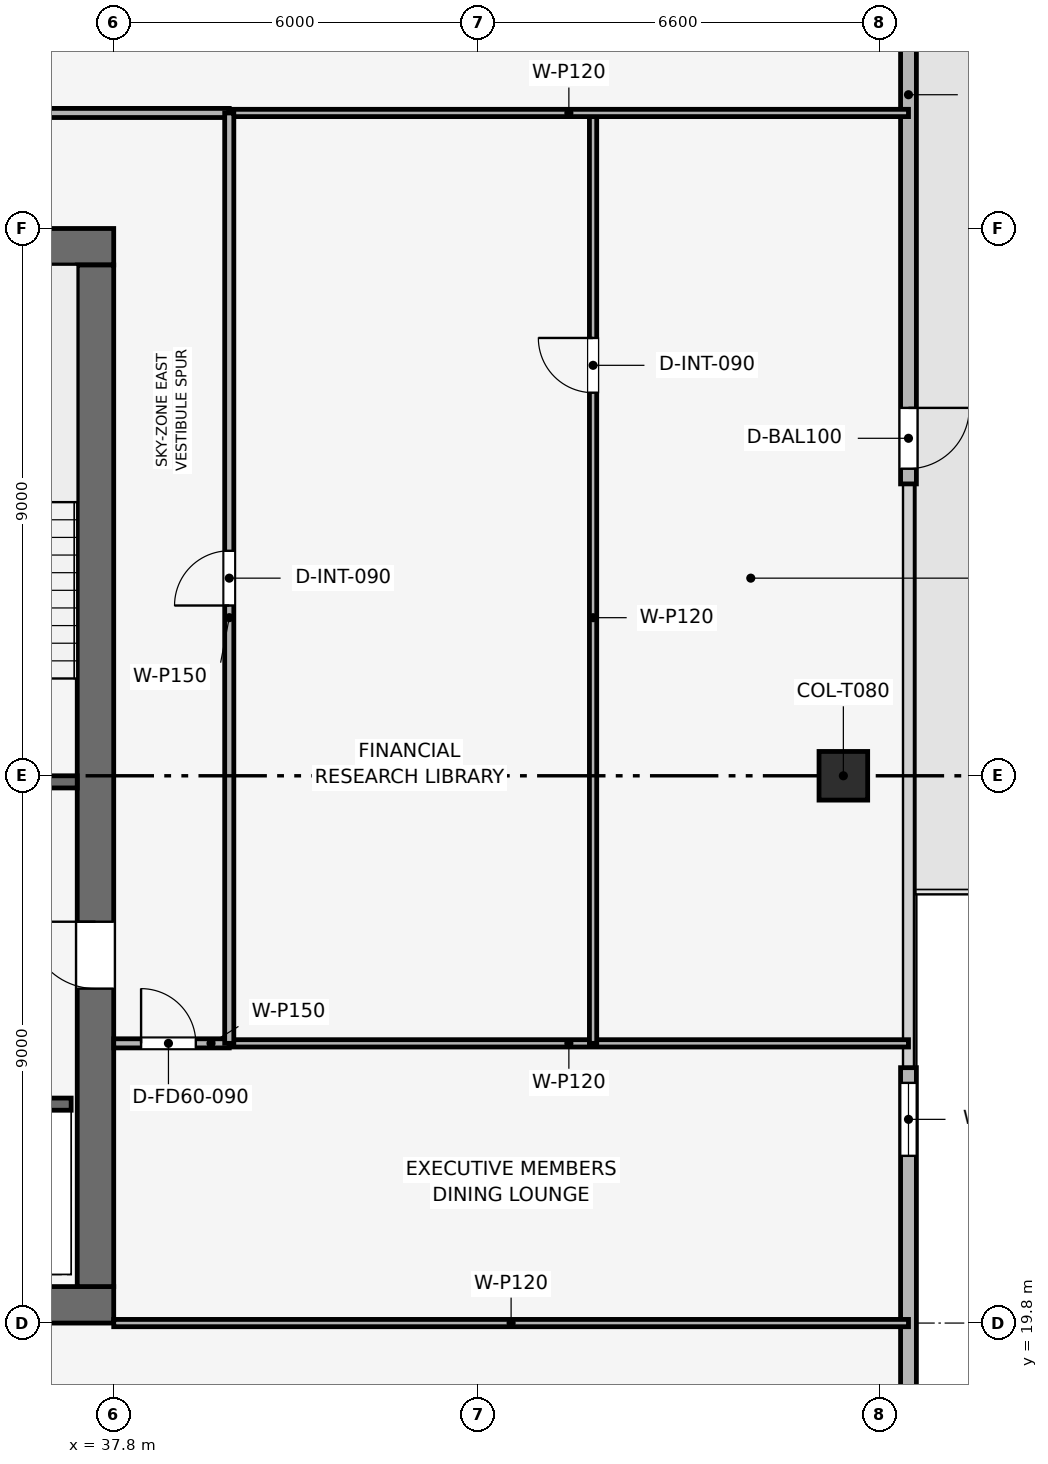
"""IFC4 building model, lengths in metres.
Left out: names, types, materials, properties, quantities, classifications, styles, units other than length and angle.
Written with IfcOpenShell. Run it as: python <this file> out.ifc"""

import sys

from ifc_helpers import new_model, si_unit, direction, frame, frame_2d, origin, origin_2d, place, context, subcontext, project, spatial, rectangle, extrude, element, fill, save


model = new_model("IFC4")
c1 = context("Model", 3, precision=1e-05, world=origin(), true_north=direction((0.0, 1.0)))
c2 = subcontext(c1, "Body", "Model", "MODEL_VIEW")
j1 = project(units=[si_unit("LENGTHUNIT", "METRE"), si_unit("PLANEANGLEUNIT", "RADIAN")], contexts=[c1])
p1 = place(None, origin())
s1 = spatial("IfcSite", under=j1, at=p1, CompositionType="ELEMENT")
p2 = place(p1, origin())
s2 = spatial("IfcBuilding", under=s1, at=p2, CompositionType="ELEMENT")
p3 = place(p2, frame((0.0, 0.0, 340.5)))
s3 = spatial("IfcBuildingStorey", under=s2, at=p3, CompositionType="ELEMENT", Elevation=340.5)
p4 = place(p3, frame((19.8, 20.1, 0.0), z_axis=(0.0, 0.0, 1.0), x_axis=(1.0, 0.0, 0.0)))
e1 = element("IfcWall", 1, at=p4, inside=s3, PredefinedType="SHEAR", context=c2, shape_type="SweptSolid", body=[
    extrude(rectangle(XDim=18.0, YDim=0.6, at=frame_2d((9.0, 0.0))), origin(), (0.0, 0.0, 1.0), 3.75),
])
p5 = place(p3, frame((19.8, 37.5, 0.0), z_axis=(0.0, 0.0, 1.0), x_axis=(1.0, 0.0, 0.0)))
e2 = element("IfcWall", 2, at=p5, inside=s3, PredefinedType="SHEAR", context=c2, shape_type="SweptSolid", body=[
    extrude(rectangle(XDim=18.0, YDim=0.6, at=frame_2d((9.0, 0.0))), origin(), (0.0, 0.0, 1.0), 3.75),
])
p6 = place(p5, frame((7.05, 0.0, 0.0)))
e3 = element("IfcOpeningElement", 3, at=p6, cuts=e2, PredefinedType="OPENING", context=c2, shape_type="SweptSolid", body=[
    extrude(rectangle(XDim=1.1, YDim=2.15, at=frame_2d((0.55, 1.075))), frame((0.0, 0.31, 0.0), z_axis=(0.0, -1.0, 0.0), x_axis=(1.0, 0.0, 0.0)), (0.0, 0.0, 1.0), 0.62),
])
p7 = place(p3, frame((37.5, 20.4, 0.0), z_axis=(0.0, 0.0, 1.0), x_axis=(0.0, 1.0, 0.0)))
e4 = element("IfcWall", 4, at=p7, inside=s3, PredefinedType="SHEAR", context=c2, shape_type="SweptSolid", body=[
    extrude(rectangle(XDim=16.8, YDim=0.6, at=frame_2d((8.4, 0.0))), origin(), (0.0, 0.0, 1.0), 3.75),
])
p8 = place(p7, frame((4.9, 0.0, 0.0)))
e5 = element("IfcOpeningElement", 5, at=p8, cuts=e4, PredefinedType="OPENING", context=c2, shape_type="SweptSolid", body=[
    extrude(rectangle(XDim=1.1, YDim=2.15, at=frame_2d((0.55, 1.075))), frame((0.0, 0.31, 0.0), z_axis=(0.0, -1.0, 0.0), x_axis=(1.0, 0.0, 0.0)), (0.0, 0.0, 1.0), 0.62),
])
p9 = place(p3, frame((49.799, 28.8, 0.003), z_axis=(-0.23339088867, 0.0, 0.972382997119), x_axis=(0.0, -1.0, 0.0)))
e6 = element("IfcColumn", 6, at=p9, inside=s3, PredefinedType="COLUMN", context=c2, shape_type="SweptSolid", body=[
    extrude(rectangle(XDim=0.8, YDim=0.8, at=origin_2d()), origin(), (0.0, 0.0, 1.0), 3.604),
])
p10 = place(p3, frame((50.87, 45.0, 0.0), z_axis=(0.0, 0.0, 1.0), x_axis=(0.0, -1.0, 0.0)))
e7 = element("IfcWall", 7, at=p10, inside=s3, PredefinedType="SOLIDWALL", context=c2, shape_type="SweptSolid", body=[
    extrude(rectangle(XDim=11.4, YDim=0.26, at=frame_2d((5.7, 0.0))), origin(), (0.0, 0.0, 1.0), 3.51),
])
p11 = place(p10, frame((10.15, 0.0, 0.0)))
e8 = element("IfcOpeningElement", 8, at=p11, cuts=e7, PredefinedType="OPENING", context=c2, shape_type="SweptSolid", body=[
    extrude(rectangle(XDim=1.0, YDim=2.2, at=frame_2d((0.5, 1.1))), frame((0.0, 0.14, 0.0), z_axis=(0.0, -1.0, 0.0), x_axis=(1.0, 0.0, 0.0)), (0.0, 0.0, 1.0), 0.28),
])
p12 = place(p3, frame((50.87, 24.0, 0.0), z_axis=(0.0, 0.0, 1.0), x_axis=(0.0, -1.0, 0.0)))
e9 = element("IfcWall", 9, at=p12, inside=s3, PredefinedType="SOLIDWALL", context=c2, shape_type="SweptSolid", body=[
    extrude(rectangle(XDim=11.4, YDim=0.26, at=frame_2d((5.7, 0.0))), origin(), (0.0, 0.0, 1.0), 3.51),
])
p13 = place(p12, frame((0.25, 0.0, 0.9)))
e10 = element("IfcOpeningElement", 10, at=p13, cuts=e9, PredefinedType="OPENING", context=c2, shape_type="SweptSolid", body=[
    extrude(rectangle(XDim=1.2, YDim=2.1, at=frame_2d((0.6, 1.05))), frame((0.0, 0.14, 0.0), z_axis=(0.0, -1.0, 0.0), x_axis=(1.0, 0.0, 0.0)), (0.0, 0.0, 1.0), 0.28),
])
p14 = place(p3, frame((34.05, 28.7, 0.0), z_axis=(0.0, 0.0, 1.0), x_axis=(1.0, 0.0, 0.0)))
e11 = element("IfcWall", 11, at=p14, inside=s3, PredefinedType="SHEAR", context=c2, shape_type="SweptSolid", body=[
    extrude(rectangle(XDim=3.15, YDim=0.2, at=frame_2d((1.575, 0.0))), origin(), (0.0, 0.0, 1.0), 3.51),
])
p15 = place(p14, frame((0.8, 0.0, 0.0)))
e12 = element("IfcOpeningElement", 12, at=p15, cuts=e11, PredefinedType="OPENING", context=c2, shape_type="SweptSolid", body=[
    extrude(rectangle(XDim=1.0, YDim=2.1, at=frame_2d((0.5, 1.05))), frame((0.0, 0.11, 0.0), z_axis=(0.0, -1.0, 0.0), x_axis=(1.0, 0.0, 0.0)), (0.0, 0.0, 1.0), 0.22),
])
p16 = place(p3, frame((34.05, 23.4, 0.0), z_axis=(0.0, 0.0, 1.0), x_axis=(1.0, 0.0, 0.0)))
e13 = element("IfcWall", 13, at=p16, inside=s3, PredefinedType="SHEAR", context=c2, shape_type="SweptSolid", body=[
    extrude(rectangle(XDim=3.05, YDim=0.2, at=frame_2d((1.525, 0.0))), origin(), (0.0, 0.0, 1.0), 3.51),
])
p17 = place(p16, frame((1.2, 0.0, 0.0)))
e14 = element("IfcOpeningElement", 14, at=p17, cuts=e13, PredefinedType="OPENING", context=c2, shape_type="SweptSolid", body=[
    extrude(rectangle(XDim=1.1, YDim=2.15, at=frame_2d((0.55, 1.075))), frame((0.0, 0.11, 0.0), z_axis=(0.0, -1.0, 0.0), x_axis=(1.0, 0.0, 0.0)), (0.0, 0.0, 1.0), 0.22),
])
p18 = place(p3, frame((37.8, 19.8, 0.0), z_axis=(0.0, 0.0, 1.0), x_axis=(1.0, 0.0, 0.0)))
e15 = element("IfcWall", 15, at=p18, inside=s3, PredefinedType="PARTITIONING", context=c2, shape_type="SweptSolid", body=[
    extrude(rectangle(XDim=13.07, YDim=0.12, at=frame_2d((6.535, 0.0))), origin(), (0.0, 0.0, 1.0), 3.095),
])
p19 = place(p3, frame((37.8, 24.4, 0.0), z_axis=(0.0, 0.0, 1.0), x_axis=(1.0, 0.0, 0.0)))
e16 = element("IfcWall", 16, at=p19, inside=s3, PredefinedType="PARTITIONING", context=c2, shape_type="SweptSolid", body=[
    extrude(rectangle(XDim=1.9, YDim=0.15, at=frame_2d((0.95, 0.0))), origin(), (0.0, 0.0, 1.0), 3.51),
])
p20 = place(p19, frame((0.45, 0.0, 0.0)))
e17 = element("IfcOpeningElement", 17, at=p20, cuts=e16, PredefinedType="OPENING", context=c2, shape_type="SweptSolid", body=[
    extrude(rectangle(XDim=0.9, YDim=2.1, at=frame_2d((0.45, 1.05))), frame((0.0, 0.085, 0.0), z_axis=(0.0, -1.0, 0.0), x_axis=(1.0, 0.0, 0.0)), (0.0, 0.0, 1.0), 0.17),
])
p21 = place(p3, frame((39.7, 24.4, 0.0), z_axis=(0.0, 0.0, 1.0), x_axis=(1.0, 0.0, 0.0)))
e18 = element("IfcWall", 18, at=p21, inside=s3, PredefinedType="PARTITIONING", context=c2, shape_type="SweptSolid", body=[
    extrude(rectangle(XDim=11.17, YDim=0.12, at=frame_2d((5.585, 0.0))), origin(), (0.0, 0.0, 1.0), 3.135),
])
p22 = place(p3, frame((45.683, 24.4, 0.0), z_axis=(0.0, 0.0, 1.0), x_axis=(0.0, 1.0, 0.0)))
e19 = element("IfcWall", 19, at=p22, inside=s3, PredefinedType="PARTITIONING", context=c2, shape_type="SweptSolid", body=[
    extrude(rectangle(XDim=15.3, YDim=0.12, at=frame_2d((7.65, 0.0))), origin(), (0.0, 0.0, 1.0), 3.095),
])
p23 = place(p22, frame((10.7, 0.0, 0.0)))
e20 = element("IfcOpeningElement", 20, at=p23, cuts=e19, PredefinedType="OPENING", context=c2, shape_type="SweptSolid", body=[
    extrude(rectangle(XDim=0.9, YDim=2.1, at=frame_2d((0.45, 1.05))), frame((0.0, 0.07, 0.0), z_axis=(0.0, -1.0, 0.0), x_axis=(1.0, 0.0, 0.0)), (0.0, 0.0, 1.0), 0.14),
])
p24 = place(p3, frame((39.7, 39.7, 0.0), z_axis=(0.0, 0.0, 1.0), x_axis=(1.0, 0.0, 0.0)))
e21 = element("IfcWall", 21, at=p24, inside=s3, PredefinedType="PARTITIONING", context=c2, shape_type="SweptSolid", body=[
    extrude(rectangle(XDim=11.17, YDim=0.12, at=frame_2d((5.585, 0.0))), origin(), (0.0, 0.0, 1.0), 3.095),
])
p25 = place(p3, frame((17.9, 39.7, 0.0), z_axis=(0.0, 0.0, 1.0), x_axis=(1.0, 0.0, 0.0)))
e22 = element("IfcWall", 22, at=p25, inside=s3, PredefinedType="PARTITIONING", context=c2, shape_type="SweptSolid", body=[
    extrude(rectangle(XDim=21.8, YDim=0.15, at=frame_2d((10.9, 0.0))), origin(), (0.0, 0.0, 1.0), 3.095),
])
p26 = place(p25, frame((2.1, 0.0, 0.0)))
e23 = element("IfcOpeningElement", 23, at=p26, cuts=e22, PredefinedType="OPENING", context=c2, shape_type="SweptSolid", body=[
    extrude(rectangle(XDim=0.9, YDim=2.1, at=frame_2d((0.45, 1.05))), frame((0.0, 0.085, 0.0), z_axis=(0.0, -1.0, 0.0), x_axis=(1.0, 0.0, 0.0)), (0.0, 0.0, 1.0), 0.17),
])
p27 = place(p25, frame((6.05, 0.0, 0.0)))
e24 = element("IfcOpeningElement", 24, at=p27, cuts=e22, PredefinedType="OPENING", context=c2, shape_type="SweptSolid", body=[
    extrude(rectangle(XDim=0.9, YDim=2.1, at=frame_2d((0.45, 1.05))), frame((0.0, 0.085, 0.0), z_axis=(0.0, -1.0, 0.0), x_axis=(1.0, 0.0, 0.0)), (0.0, 0.0, 1.0), 0.17),
])
p28 = place(p25, frame((8.95, 0.0, 0.0)))
e25 = element("IfcOpeningElement", 25, at=p28, cuts=e22, PredefinedType="OPENING", context=c2, shape_type="SweptSolid", body=[
    extrude(rectangle(XDim=0.9, YDim=2.1, at=frame_2d((0.45, 1.05))), frame((0.0, 0.085, 0.0), z_axis=(0.0, -1.0, 0.0), x_axis=(1.0, 0.0, 0.0)), (0.0, 0.0, 1.0), 0.17),
])
p29 = place(p25, frame((11.7, 0.0, 0.0)))
e26 = element("IfcOpeningElement", 26, at=p29, cuts=e22, PredefinedType="OPENING", context=c2, shape_type="SweptSolid", body=[
    extrude(rectangle(XDim=0.95, YDim=2.1, at=frame_2d((0.475, 1.05))), frame((0.0, 0.085, 0.0), z_axis=(0.0, -1.0, 0.0), x_axis=(1.0, 0.0, 0.0)), (0.0, 0.0, 1.0), 0.17),
])
p30 = place(p25, frame((17.2, 0.0, 0.0)))
e27 = element("IfcOpeningElement", 27, at=p30, cuts=e22, PredefinedType="OPENING", context=c2, shape_type="SweptSolid", body=[
    extrude(rectangle(XDim=0.9, YDim=2.1, at=frame_2d((0.45, 1.05))), frame((0.0, 0.085, 0.0), z_axis=(0.0, -1.0, 0.0), x_axis=(1.0, 0.0, 0.0)), (0.0, 0.0, 1.0), 0.17),
])
p31 = place(p3, frame((39.7, 24.4, 0.0), z_axis=(0.0, 0.0, 1.0), x_axis=(0.0, 1.0, 0.0)))
e28 = element("IfcWall", 28, at=p31, inside=s3, PredefinedType="PARTITIONING", context=c2, shape_type="SweptSolid", body=[
    extrude(rectangle(XDim=15.3, YDim=0.15, at=frame_2d((7.65, 0.0))), origin(), (0.0, 0.0, 1.0), 3.095),
])
p32 = place(p31, frame((7.2, 0.0, 0.0)))
e29 = element("IfcOpeningElement", 29, at=p32, cuts=e28, PredefinedType="OPENING", context=c2, shape_type="SweptSolid", body=[
    extrude(rectangle(XDim=0.9, YDim=2.1, at=frame_2d((0.45, 1.05))), frame((0.0, 0.085, 0.0), z_axis=(0.0, -1.0, 0.0), x_axis=(1.0, 0.0, 0.0)), (0.0, 0.0, 1.0), 0.17),
])
p33 = place(p11, origin())
e30 = element("IfcDoor", 30, at=p33, inside=s3, OperationType="SINGLE_SWING_LEFT", PredefinedType="DOOR", context=c2, shape_type="SweptSolid", body=[
    extrude(rectangle(XDim=1.0, YDim=2.2, at=frame_2d((0.5, 1.1))), frame((0.0, 0.025, 0.0), z_axis=(0.0, -1.0, 0.0), x_axis=(1.0, 0.0, 0.0)), (0.0, 0.0, 1.0), 0.05),
])
fill(e8, e30)
p34 = place(p13, origin())
e31 = element("IfcWindow", 31, at=p34, inside=s3, PartitioningType="SINGLE_PANEL", PredefinedType="WINDOW", context=c2, shape_type="SweptSolid", body=[
    extrude(rectangle(XDim=1.2, YDim=2.1, at=frame_2d((0.6, 1.05))), frame((0.0, 0.03, 0.0), z_axis=(0.0, -1.0, 0.0), x_axis=(1.0, 0.0, 0.0)), (0.0, 0.0, 1.0), 0.06),
])
fill(e10, e31)
p35 = place(p20, origin())
e32 = element("IfcDoor", 32, at=p35, inside=s3, OperationType="SINGLE_SWING_LEFT", PredefinedType="DOOR", context=c2, shape_type="SweptSolid", body=[
    extrude(rectangle(XDim=0.9, YDim=2.1, at=frame_2d((0.45, 1.05))), frame((0.0, 0.025, 0.0), z_axis=(0.0, -1.0, 0.0), x_axis=(1.0, 0.0, 0.0)), (0.0, 0.0, 1.0), 0.05),
])
fill(e17, e32)
p36 = place(p23, origin())
e33 = element("IfcDoor", 33, at=p36, inside=s3, OperationType="SINGLE_SWING_RIGHT", PredefinedType="DOOR", context=c2, shape_type="SweptSolid", body=[
    extrude(rectangle(XDim=0.9, YDim=2.1, at=frame_2d((0.45, 1.05))), frame((0.0, 0.025, 0.0), z_axis=(0.0, -1.0, 0.0), x_axis=(1.0, 0.0, 0.0)), (0.0, 0.0, 1.0), 0.05),
])
fill(e20, e33)
p37 = place(p32, origin())
e34 = element("IfcDoor", 34, at=p37, inside=s3, OperationType="SINGLE_SWING_LEFT", PredefinedType="DOOR", context=c2, shape_type="SweptSolid", body=[
    extrude(rectangle(XDim=0.9, YDim=2.1, at=frame_2d((0.45, 1.05))), frame((0.0, 0.025, 0.0), z_axis=(0.0, -1.0, 0.0), x_axis=(1.0, 0.0, 0.0)), (0.0, 0.0, 1.0), 0.05),
])
fill(e29, e34)
p38 = place(p8, origin())
e35 = element("IfcDoor", 35, at=p38, inside=s3, OperationType="SINGLE_SWING_RIGHT", PredefinedType="DOOR", context=c2, shape_type="SweptSolid", body=[
    extrude(rectangle(XDim=1.1, YDim=2.15, at=frame_2d((0.55, 1.075))), frame((0.0, 0.025, 0.0), z_axis=(0.0, -1.0, 0.0), x_axis=(1.0, 0.0, 0.0)), (0.0, 0.0, 1.0), 0.05),
])
fill(e5, e35)
save(model, sys.argv[1])
